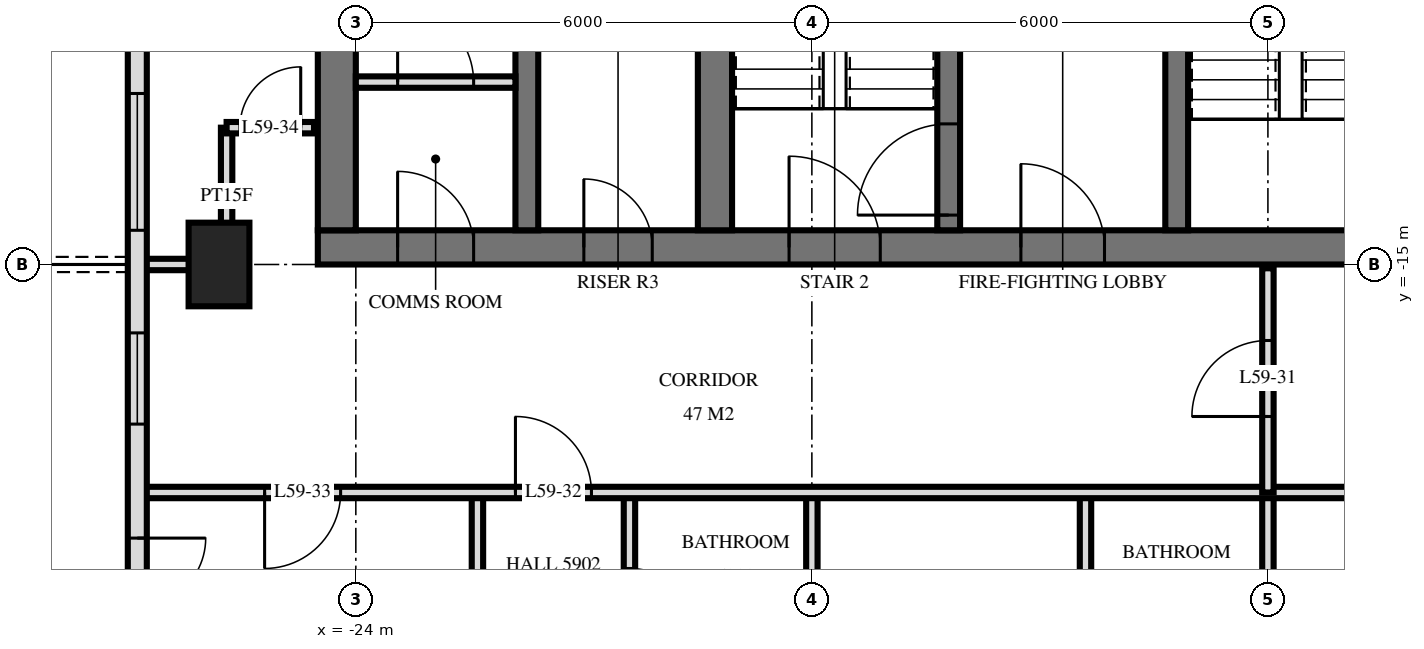
"""IFC4 building model, lengths in metres.
Left out: names, types, materials, properties, quantities, classifications, styles, units other than length and angle.
Written with IfcOpenShell. Run it as: python <this file> out.ifc"""

import sys

from ifc_helpers import new_model, si_unit, direction, frame, frame_2d, origin, origin_2d, place, context, subcontext, project, spatial, rectangle, extrude, element, fill, save


model = new_model("IFC4")
c1 = context("Model", 3, precision=1e-05, world=origin(), true_north=direction((0.0, 1.0)))
c2 = subcontext(c1, "Body", "Model", "MODEL_VIEW")
j1 = project(units=[si_unit("LENGTHUNIT", "METRE"), si_unit("PLANEANGLEUNIT", "RADIAN")], contexts=[c1])
p1 = place(None, origin())
s1 = spatial("IfcSite", under=j1, at=p1, CompositionType="ELEMENT")
p2 = place(p1, origin())
s2 = spatial("IfcBuilding", under=s1, at=p2, CompositionType="ELEMENT")
p3 = place(p2, frame((0.0, 0.0, 225.6)))
s3 = spatial("IfcBuildingStorey", under=s2, at=p3, CompositionType="ELEMENT", Elevation=225.6)
p4 = place(p3, frame((-25.8, -15.0, 0.0), z_axis=(0.0, 0.0, 1.0), x_axis=(0.0, 1.0, 0.0)))
e1 = element("IfcColumn", 1, at=p4, inside=s3, PredefinedType="COLUMN", context=c2, shape_type="SweptSolid", body=[
    extrude(rectangle(XDim=1.1, YDim=0.8, at=origin_2d()), origin(), (0.0, 0.0, 1.0), 3.5),
])
p5 = place(p3, frame((-24.5, -14.775, 0.0), z_axis=(0.0, 0.0, 1.0), x_axis=(1.0, 0.0, 0.0)))
e2 = element("IfcWall", 2, at=p5, inside=s3, PredefinedType="SHEAR", context=c2, shape_type="SweptSolid", body=[
    extrude(rectangle(XDim=14.5, YDim=0.45, at=frame_2d((7.25, 0.0))), origin(), (0.0, 0.0, 1.0), 3.5),
])
p6 = place(p5, frame((6.2, 0.0, 0.0)))
e3 = element("IfcOpeningElement", 3, at=p6, cuts=e2, PredefinedType="OPENING", context=c2, shape_type="SweptSolid", body=[
    extrude(rectangle(XDim=1.2, YDim=2.1, at=frame_2d((0.6, 1.05))), frame((0.0, 0.235, 0.0), z_axis=(0.0, -1.0, 0.0), x_axis=(1.0, 0.0, 0.0)), (0.0, 0.0, 1.0), 0.47),
])
p7 = place(p5, frame((9.25, 0.0, 0.0)))
e4 = element("IfcOpeningElement", 4, at=p7, cuts=e2, PredefinedType="OPENING", context=c2, shape_type="SweptSolid", body=[
    extrude(rectangle(XDim=1.1, YDim=2.1, at=frame_2d((0.55, 1.05))), frame((0.0, 0.235, 0.0), z_axis=(0.0, -1.0, 0.0), x_axis=(1.0, 0.0, 0.0)), (0.0, 0.0, 1.0), 0.47),
])
p8 = place(p5, frame((3.5, 0.0, 0.0)))
e5 = element("IfcOpeningElement", 5, at=p8, cuts=e2, PredefinedType="OPENING", context=c2, shape_type="SweptSolid", body=[
    extrude(rectangle(XDim=0.9, YDim=2.1, at=frame_2d((0.45, 1.05))), frame((0.0, 0.235, 0.0), z_axis=(0.0, -1.0, 0.0), x_axis=(1.0, 0.0, 0.0)), (0.0, 0.0, 1.0), 0.47),
])
p9 = place(p5, frame((1.05, 0.0, 0.0)))
e6 = element("IfcOpeningElement", 6, at=p9, cuts=e2, PredefinedType="OPENING", context=c2, shape_type="SweptSolid", body=[
    extrude(rectangle(XDim=1.0, YDim=2.1, at=frame_2d((0.5, 1.05))), frame((0.0, 0.235, 0.0), z_axis=(0.0, -1.0, 0.0), x_axis=(1.0, 0.0, 0.0)), (0.0, 0.0, 1.0), 0.47),
])
p10 = place(p3, frame((-24.25, -14.55, 0.0), z_axis=(0.0, 0.0, 1.0), x_axis=(0.0, 1.0, 0.0)))
e7 = element("IfcWall", 7, at=p10, inside=s3, PredefinedType="SHEAR", context=c2, shape_type="SweptSolid", body=[
    extrude(rectangle(XDim=14.1, YDim=0.5, at=frame_2d((7.05, 0.0))), origin(), (0.0, 0.0, 1.0), 3.5),
])
p11 = place(p3, frame((-13.2, -14.55, 0.0), z_axis=(0.0, 0.0, 1.0), x_axis=(0.0, 1.0, 0.0)))
e8 = element("IfcWall", 8, at=p11, inside=s3, PredefinedType="SHEAR", context=c2, shape_type="SweptSolid", body=[
    extrude(rectangle(XDim=5.4, YDim=0.3, at=frame_2d((2.7, 0.0))), origin(), (0.0, 0.0, 1.0), 3.5),
])
p12 = place(p11, frame((4.0, 0.0, 0.0)))
e9 = element("IfcOpeningElement", 9, at=p12, cuts=e8, PredefinedType="OPENING", context=c2, shape_type="SweptSolid", body=[
    extrude(rectangle(XDim=1.2, YDim=2.1, at=frame_2d((0.6, 1.05))), frame((0.0, 0.16, 0.0), z_axis=(0.0, -1.0, 0.0), x_axis=(1.0, 0.0, 0.0)), (0.0, 0.0, 1.0), 0.32),
])
p13 = place(p3, frame((-16.2, -14.55, 0.0), z_axis=(0.0, 0.0, 1.0), x_axis=(0.0, 1.0, 0.0)))
e10 = element("IfcWall", 10, at=p13, inside=s3, PredefinedType="SHEAR", context=c2, shape_type="SweptSolid", body=[
    extrude(rectangle(XDim=5.4, YDim=0.3, at=frame_2d((2.7, 0.0))), origin(), (0.0, 0.0, 1.0), 3.5),
])
p14 = place(p13, frame((0.2, 0.0, 0.0)))
e11 = element("IfcOpeningElement", 11, at=p14, cuts=e10, PredefinedType="OPENING", context=c2, shape_type="SweptSolid", body=[
    extrude(rectangle(XDim=1.2, YDim=2.1, at=frame_2d((0.6, 1.05))), frame((0.0, 0.16, 0.0), z_axis=(0.0, -1.0, 0.0), x_axis=(1.0, 0.0, 0.0)), (0.0, 0.0, 1.0), 0.32),
])
p15 = place(p3, frame((-19.275, -14.55, 0.0), z_axis=(0.0, 0.0, 1.0), x_axis=(0.0, 1.0, 0.0)))
e12 = element("IfcWall", 12, at=p15, inside=s3, PredefinedType="SHEAR", context=c2, shape_type="SweptSolid", body=[
    extrude(rectangle(XDim=5.4, YDim=0.45, at=frame_2d((2.7, 0.0))), origin(), (0.0, 0.0, 1.0), 3.5),
])
p16 = place(p3, frame((-21.75, -14.55, 0.0), z_axis=(0.0, 0.0, 1.0), x_axis=(0.0, 1.0, 0.0)))
e13 = element("IfcWall", 13, at=p16, inside=s3, PredefinedType="SHEAR", context=c2, shape_type="SweptSolid", body=[
    extrude(rectangle(XDim=5.4, YDim=0.3, at=frame_2d((2.7, 0.0))), origin(), (0.0, 0.0, 1.0), 3.5),
])
p17 = place(p3, frame((-26.875, -3.325, 0.0), z_axis=(0.0, 0.0, 1.0), x_axis=(0.0, -1.0, 0.0)))
e14 = element("IfcWall", 14, at=p17, inside=s3, PredefinedType="SOLIDWALL", context=c2, shape_type="SweptSolid", body=[
    extrude(rectangle(XDim=21.551, YDim=0.25, at=frame_2d((10.775, 0.0))), origin(), (0.0, 0.0, 1.0), 3.22),
])
p18 = place(p17, frame((6.575, 0.0, 0.0)))
e15 = element("IfcOpeningElement", 15, at=p18, cuts=e14, PredefinedType="OPENING", context=c2, shape_type="SweptSolid", body=[
    extrude(rectangle(XDim=1.8, YDim=2.4, at=frame_2d((0.9, 1.2))), frame((0.0, 0.135, 0.0), z_axis=(0.0, -1.0, 0.0), x_axis=(1.0, 0.0, 0.0)), (0.0, 0.0, 1.0), 0.27),
])
p19 = place(p17, frame((9.425, 0.0, 0.9)))
e16 = element("IfcOpeningElement", 16, at=p19, cuts=e14, PredefinedType="OPENING", context=c2, shape_type="SweptSolid", body=[
    extrude(rectangle(XDim=1.8, YDim=1.5, at=frame_2d((0.9, 0.75))), frame((0.0, 0.135, 0.0), z_axis=(0.0, -1.0, 0.0), x_axis=(1.0, 0.0, 0.0)), (0.0, 0.0, 1.0), 0.27),
])
p20 = place(p17, frame((12.575, 0.0, 0.9)))
e17 = element("IfcOpeningElement", 17, at=p20, cuts=e14, PredefinedType="OPENING", context=c2, shape_type="SweptSolid", body=[
    extrude(rectangle(XDim=1.2, YDim=1.5, at=frame_2d((0.6, 0.75))), frame((0.0, 0.135, 0.0), z_axis=(0.0, -1.0, 0.0), x_axis=(1.0, 0.0, 0.0)), (0.0, 0.0, 1.0), 0.27),
])
p21 = place(p17, frame((15.275, 0.0, 0.0)))
e18 = element("IfcOpeningElement", 18, at=p21, cuts=e14, PredefinedType="OPENING", context=c2, shape_type="SweptSolid", body=[
    extrude(rectangle(XDim=1.8, YDim=2.4, at=frame_2d((0.9, 1.2))), frame((0.0, 0.135, 0.0), z_axis=(0.0, -1.0, 0.0), x_axis=(1.0, 0.0, 0.0)), (0.0, 0.0, 1.0), 0.27),
])
p22 = place(p17, frame((18.875, 0.0, 0.0)))
e19 = element("IfcOpeningElement", 19, at=p22, cuts=e14, PredefinedType="OPENING", context=c2, shape_type="SweptSolid", body=[
    extrude(rectangle(XDim=1.8, YDim=2.4, at=frame_2d((0.9, 1.2))), frame((0.0, 0.135, 0.0), z_axis=(0.0, -1.0, 0.0), x_axis=(1.0, 0.0, 0.0)), (0.0, 0.0, 1.0), 0.27),
])
p23 = place(p3, frame((-24.0, -12.6, 0.0), z_axis=(0.0, 0.0, 1.0), x_axis=(1.0, 0.0, 0.0)))
e20 = element("IfcWall", 20, at=p23, inside=s3, PredefinedType="PARTITIONING", context=c2, shape_type="SweptSolid", body=[
    extrude(rectangle(XDim=2.1, YDim=0.15, at=frame_2d((1.05, 0.0))), origin(), (0.0, 0.0, 1.0), 3.2),
])
p24 = place(p23, frame((0.55, 0.0, 0.0)))
e21 = element("IfcOpeningElement", 21, at=p24, cuts=e20, PredefinedType="OPENING", context=c2, shape_type="SweptSolid", body=[
    extrude(rectangle(XDim=1.0, YDim=2.1, at=frame_2d((0.5, 1.05))), frame((0.0, 0.085, 0.0), z_axis=(0.0, -1.0, 0.0), x_axis=(1.0, 0.0, 0.0)), (0.0, 0.0, 1.0), 0.17),
])
p25 = place(p3, frame((-12.0, -18.0, 0.0), z_axis=(0.0, 0.0, 1.0), x_axis=(0.0, 1.0, 0.0)))
e22 = element("IfcWall", 22, at=p25, inside=s3, PredefinedType="PARTITIONING", context=c2, shape_type="SweptSolid", body=[
    extrude(rectangle(XDim=2.95, YDim=0.15, at=frame_2d((1.475, 0.0))), origin(), (0.0, 0.0, 1.0), 3.22),
])
p26 = place(p25, frame((1.0, 0.0, 0.0)))
e23 = element("IfcOpeningElement", 23, at=p26, cuts=e22, PredefinedType="OPENING", context=c2, shape_type="SweptSolid", body=[
    extrude(rectangle(XDim=1.0, YDim=2.1, at=frame_2d((0.5, 1.05))), frame((0.0, 0.085, 0.0), z_axis=(0.0, -1.0, 0.0), x_axis=(1.0, 0.0, 0.0)), (0.0, 0.0, 1.0), 0.17),
])
p27 = place(p3, frame((-12.0, -29.22, 0.0), z_axis=(0.0, 0.0, 1.0), x_axis=(0.0, 1.0, 0.0)))
e24 = element("IfcWall", 24, at=p27, inside=s3, PredefinedType="PARTITIONING", context=c2, shape_type="SweptSolid", body=[
    extrude(rectangle(XDim=11.22, YDim=0.15, at=frame_2d((5.61, 0.0))), origin(), (0.0, 0.0, 1.0), 3.22),
])
for number, where, z_axis, x_axis in (
    (25, (-14.4, -21.0, 0.0), (0.0, 0.0, 1.0), (0.0, 1.0, 0.0)),
    (26, (-18.0, -21.0, 0.0), (0.0, 0.0, 1.0), (0.0, 1.0, 0.0)),
):
    element("IfcWall", number, at=place(p3, frame(where, z_axis=z_axis, x_axis=x_axis)), inside=s3, PredefinedType="PARTITIONING", context=c2, shape_type="SweptSolid", body=[
        extrude(rectangle(XDim=3.0, YDim=0.15, at=frame_2d((1.5, 0.0))), origin(), (0.0, 0.0, 1.0), 3.22),
    ])
p28 = place(p3, frame((-20.4, -21.0, 0.0), z_axis=(0.0, 0.0, 1.0), x_axis=(0.0, 1.0, 0.0)))
e27 = element("IfcWall", 27, at=p28, inside=s3, PredefinedType="PARTITIONING", context=c2, shape_type="SweptSolid", body=[
    extrude(rectangle(XDim=3.0, YDim=0.15, at=frame_2d((1.5, 0.0))), origin(), (0.0, 0.0, 1.0), 3.22),
])
p29 = place(p28, frame((1.0, 0.0, 0.0)))
e28 = element("IfcOpeningElement", 28, at=p29, cuts=e27, PredefinedType="OPENING", context=c2, shape_type="SweptSolid", body=[
    extrude(rectangle(XDim=1.0, YDim=2.1, at=frame_2d((0.5, 1.05))), frame((0.0, 0.085, 0.0), z_axis=(0.0, -1.0, 0.0), x_axis=(1.0, 0.0, 0.0)), (0.0, 0.0, 1.0), 0.17),
])
p30 = place(p3, frame((-22.4, -21.0, 0.0), z_axis=(0.0, 0.0, 1.0), x_axis=(0.0, 1.0, 0.0)))
e29 = element("IfcWall", 29, at=p30, inside=s3, PredefinedType="PARTITIONING", context=c2, shape_type="SweptSolid", body=[
    extrude(rectangle(XDim=3.0, YDim=0.15, at=frame_2d((1.5, 0.0))), origin(), (0.0, 0.0, 1.0), 3.22),
])
p31 = place(p3, frame((-25.7, -15.0, 0.0), z_axis=(0.0, 0.0, 1.0), x_axis=(0.0, 1.0, 0.0)))
e30 = element("IfcWall", 30, at=p31, inside=s3, PredefinedType="PARTITIONING", context=c2, shape_type="SweptSolid", body=[
    extrude(rectangle(XDim=1.8, YDim=0.15, at=frame_2d((0.9, 0.0))), origin(), (0.0, 0.0, 1.0), 3.22),
])
p32 = place(p3, frame((-26.82, -18.0, 0.0), z_axis=(0.0, 0.0, 1.0), x_axis=(1.0, 0.0, 0.0)))
e31 = element("IfcWall", 31, at=p32, inside=s3, PredefinedType="PARTITIONING", context=c2, shape_type="SweptSolid", body=[
    extrude(rectangle(XDim=53.64, YDim=0.15, at=frame_2d((26.82, 0.0))), origin(), (0.0, 0.0, 1.0), 3.22),
])
p33 = place(p32, frame((4.92, 0.0, 0.0)))
e32 = element("IfcOpeningElement", 32, at=p33, cuts=e31, PredefinedType="OPENING", context=c2, shape_type="SweptSolid", body=[
    extrude(rectangle(XDim=1.0, YDim=2.1, at=frame_2d((0.5, 1.05))), frame((0.0, 0.085, 0.0), z_axis=(0.0, -1.0, 0.0), x_axis=(1.0, 0.0, 0.0)), (0.0, 0.0, 1.0), 0.17),
])
p34 = place(p32, frame((1.62, 0.0, 0.0)))
e33 = element("IfcOpeningElement", 33, at=p34, cuts=e31, PredefinedType="OPENING", context=c2, shape_type="SweptSolid", body=[
    extrude(rectangle(XDim=1.0, YDim=2.1, at=frame_2d((0.5, 1.05))), frame((0.0, 0.085, 0.0), z_axis=(0.0, -1.0, 0.0), x_axis=(1.0, 0.0, 0.0)), (0.0, 0.0, 1.0), 0.17),
])
p35 = place(p32, frame((38.97, 0.0, 0.0)))
e34 = element("IfcOpeningElement", 34, at=p35, cuts=e31, PredefinedType="OPENING", context=c2, shape_type="SweptSolid", body=[
    extrude(rectangle(XDim=1.0, YDim=2.1, at=frame_2d((0.5, 1.05))), frame((0.0, 0.085, 0.0), z_axis=(0.0, -1.0, 0.0), x_axis=(1.0, 0.0, 0.0)), (0.0, 0.0, 1.0), 0.17),
])
p36 = place(p32, frame((48.72, 0.0, 0.0)))
e35 = element("IfcOpeningElement", 35, at=p36, cuts=e31, PredefinedType="OPENING", context=c2, shape_type="SweptSolid", body=[
    extrude(rectangle(XDim=1.0, YDim=2.1, at=frame_2d((0.5, 1.05))), frame((0.0, 0.085, 0.0), z_axis=(0.0, -1.0, 0.0), x_axis=(1.0, 0.0, 0.0)), (0.0, 0.0, 1.0), 0.17),
])
p37 = place(p32, frame((46.92, 0.0, 0.0)))
e36 = element("IfcOpeningElement", 36, at=p37, cuts=e31, PredefinedType="OPENING", context=c2, shape_type="SweptSolid", body=[
    extrude(rectangle(XDim=1.0, YDim=2.1, at=frame_2d((0.5, 1.05))), frame((0.0, 0.085, 0.0), z_axis=(0.0, -1.0, 0.0), x_axis=(1.0, 0.0, 0.0)), (0.0, 0.0, 1.0), 0.17),
])
p38 = place(p32, frame((18.82, 0.0, 0.0)))
e37 = element("IfcOpeningElement", 37, at=p38, cuts=e31, PredefinedType="OPENING", context=c2, shape_type="SweptSolid", body=[
    extrude(rectangle(XDim=1.0, YDim=2.1, at=frame_2d((0.5, 1.05))), frame((0.0, 0.085, 0.0), z_axis=(0.0, -1.0, 0.0), x_axis=(1.0, 0.0, 0.0)), (0.0, 0.0, 1.0), 0.17),
])
p39 = place(p32, frame((27.82, 0.0, 0.0)))
e38 = element("IfcOpeningElement", 38, at=p39, cuts=e31, PredefinedType="OPENING", context=c2, shape_type="SweptSolid", body=[
    extrude(rectangle(XDim=1.0, YDim=2.1, at=frame_2d((0.5, 1.05))), frame((0.0, 0.085, 0.0), z_axis=(0.0, -1.0, 0.0), x_axis=(1.0, 0.0, 0.0)), (0.0, 0.0, 1.0), 0.17),
])
p40 = place(p32, frame((35.32, 0.0, 0.0)))
e39 = element("IfcOpeningElement", 39, at=p40, cuts=e31, PredefinedType="OPENING", context=c2, shape_type="SweptSolid", body=[
    extrude(rectangle(XDim=1.0, YDim=2.1, at=frame_2d((0.5, 1.05))), frame((0.0, 0.085, 0.0), z_axis=(0.0, -1.0, 0.0), x_axis=(1.0, 0.0, 0.0)), (0.0, 0.0, 1.0), 0.17),
])
p41 = place(p3, frame((-26.82, -15.0, 0.0), z_axis=(0.0, 0.0, 1.0), x_axis=(1.0, 0.0, 0.0)))
e40 = element("IfcWall", 40, at=p41, inside=s3, PredefinedType="PARTITIONING", context=c2, shape_type="SweptSolid", body=[
    extrude(rectangle(XDim=1.12, YDim=0.15, at=frame_2d((0.56, 0.0))), origin(), (0.0, 0.0, 1.0), 3.22),
])
p42 = place(p3, frame((-25.7, -13.2, 0.0), z_axis=(0.0, 0.0, 1.0), x_axis=(1.0, 0.0, 0.0)))
e41 = element("IfcWall", 41, at=p42, inside=s3, PredefinedType="PARTITIONING", context=c2, shape_type="SweptSolid", body=[
    extrude(rectangle(XDim=1.15, YDim=0.15, at=frame_2d((0.575, 0.0))), origin(), (0.0, 0.0, 1.0), 3.22),
])
p43 = place(p42, frame((0.175, 0.0, 0.0)))
e42 = element("IfcOpeningElement", 42, at=p43, cuts=e41, PredefinedType="OPENING", context=c2, shape_type="SweptSolid", body=[
    extrude(rectangle(XDim=0.8, YDim=2.1, at=frame_2d((0.4, 1.05))), frame((0.0, 0.085, 0.0), z_axis=(0.0, -1.0, 0.0), x_axis=(1.0, 0.0, 0.0)), (0.0, 0.0, 1.0), 0.17),
])
p44 = place(p19, origin())
e43 = element("IfcWindow", 43, at=p44, inside=s3, PartitioningType="SINGLE_PANEL", PredefinedType="WINDOW", context=c2, shape_type="SweptSolid", body=[
    extrude(rectangle(XDim=1.8, YDim=1.5, at=frame_2d((0.9, 0.75))), frame((0.0, 0.03, 0.0), z_axis=(0.0, -1.0, 0.0), x_axis=(1.0, 0.0, 0.0)), (0.0, 0.0, 1.0), 0.06),
])
fill(e16, e43)
p45 = place(p20, origin())
e44 = element("IfcWindow", 44, at=p45, inside=s3, PartitioningType="SINGLE_PANEL", PredefinedType="WINDOW", context=c2, shape_type="SweptSolid", body=[
    extrude(rectangle(XDim=1.2, YDim=1.5, at=frame_2d((0.6, 0.75))), frame((0.0, 0.03, 0.0), z_axis=(0.0, -1.0, 0.0), x_axis=(1.0, 0.0, 0.0)), (0.0, 0.0, 1.0), 0.06),
])
fill(e17, e44)
p46 = place(p21, origin())
e45 = element("IfcDoor", 45, at=p46, inside=s3, OperationType="DOUBLE_DOOR_SINGLE_SWING", PredefinedType="DOOR", context=c2, shape_type="SweptSolid", body=[
    extrude(rectangle(XDim=1.8, YDim=2.4, at=frame_2d((0.9, 1.2))), frame((0.0, 0.025, 0.0), z_axis=(0.0, -1.0, 0.0), x_axis=(1.0, 0.0, 0.0)), (0.0, 0.0, 1.0), 0.05),
])
fill(e18, e45)
p47 = place(p6, origin())
e46 = element("IfcDoor", 46, at=p47, inside=s3, OperationType="SINGLE_SWING_RIGHT", PredefinedType="DOOR", context=c2, shape_type="SweptSolid", body=[
    extrude(rectangle(XDim=1.2, YDim=2.1, at=frame_2d((0.6, 1.05))), frame((0.0, 0.025, 0.0), z_axis=(0.0, -1.0, 0.0), x_axis=(1.0, 0.0, 0.0)), (0.0, 0.0, 1.0), 0.05),
])
fill(e3, e46)
p48 = place(p7, origin())
e47 = element("IfcDoor", 47, at=p48, inside=s3, OperationType="SINGLE_SWING_RIGHT", PredefinedType="DOOR", context=c2, shape_type="SweptSolid", body=[
    extrude(rectangle(XDim=1.1, YDim=2.1, at=frame_2d((0.55, 1.05))), frame((0.0, 0.025, 0.0), z_axis=(0.0, -1.0, 0.0), x_axis=(1.0, 0.0, 0.0)), (0.0, 0.0, 1.0), 0.05),
])
fill(e4, e47)
p49 = place(p8, origin())
e48 = element("IfcDoor", 48, at=p49, inside=s3, OperationType="SINGLE_SWING_RIGHT", PredefinedType="DOOR", context=c2, shape_type="SweptSolid", body=[
    extrude(rectangle(XDim=0.9, YDim=2.1, at=frame_2d((0.45, 1.05))), frame((0.0, 0.025, 0.0), z_axis=(0.0, -1.0, 0.0), x_axis=(1.0, 0.0, 0.0)), (0.0, 0.0, 1.0), 0.05),
])
fill(e5, e48)
p50 = place(p9, origin())
e49 = element("IfcDoor", 49, at=p50, inside=s3, OperationType="SINGLE_SWING_RIGHT", PredefinedType="DOOR", context=c2, shape_type="SweptSolid", body=[
    extrude(rectangle(XDim=1.0, YDim=2.1, at=frame_2d((0.5, 1.05))), frame((0.0, 0.025, 0.0), z_axis=(0.0, -1.0, 0.0), x_axis=(1.0, 0.0, 0.0)), (0.0, 0.0, 1.0), 0.05),
])
fill(e6, e49)
p51 = place(p14, origin())
e50 = element("IfcDoor", 50, at=p51, inside=s3, OperationType="SINGLE_SWING_RIGHT", PredefinedType="DOOR", context=c2, shape_type="SweptSolid", body=[
    extrude(rectangle(XDim=1.2, YDim=2.1, at=frame_2d((0.6, 1.05))), frame((0.0, 0.025, 0.0), z_axis=(0.0, -1.0, 0.0), x_axis=(1.0, 0.0, 0.0)), (0.0, 0.0, 1.0), 0.05),
])
fill(e11, e50)
p52 = place(p24, origin())
e51 = element("IfcDoor", 51, at=p52, inside=s3, OperationType="SINGLE_SWING_RIGHT", PredefinedType="DOOR", context=c2, shape_type="SweptSolid", body=[
    extrude(rectangle(XDim=1.0, YDim=2.1, at=frame_2d((0.5, 1.05))), frame((0.0, 0.025, 0.0), z_axis=(0.0, -1.0, 0.0), x_axis=(1.0, 0.0, 0.0)), (0.0, 0.0, 1.0), 0.05),
])
fill(e21, e51)
p53 = place(p26, origin())
e52 = element("IfcDoor", 52, at=p53, inside=s3, OperationType="SINGLE_SWING_RIGHT", PredefinedType="DOOR", context=c2, shape_type="SweptSolid", body=[
    extrude(rectangle(XDim=1.0, YDim=2.1, at=frame_2d((0.5, 1.05))), frame((0.0, 0.025, 0.0), z_axis=(0.0, -1.0, 0.0), x_axis=(1.0, 0.0, 0.0)), (0.0, 0.0, 1.0), 0.05),
])
fill(e23, e52)
p54 = place(p33, origin())
e53 = element("IfcDoor", 53, at=p54, inside=s3, OperationType="SINGLE_SWING_RIGHT", PredefinedType="DOOR", context=c2, shape_type="SweptSolid", body=[
    extrude(rectangle(XDim=1.0, YDim=2.1, at=frame_2d((0.5, 1.05))), frame((0.0, 0.025, 0.0), z_axis=(0.0, -1.0, 0.0), x_axis=(1.0, 0.0, 0.0)), (0.0, 0.0, 1.0), 0.05),
])
fill(e32, e53)
p55 = place(p34, frame((0.5, 0.0, 0.0), z_axis=(0.0, 0.0, 1.0), x_axis=(-1.0, 0.0, 0.0)))
e54 = element("IfcDoor", 54, at=p55, inside=s3, OperationType="SINGLE_SWING_LEFT", PredefinedType="DOOR", context=c2, shape_type="SweptSolid", body=[
    extrude(rectangle(XDim=1.0, YDim=2.1, at=frame_2d((0.0, 1.05))), frame((0.0, -0.025, 0.0), z_axis=(0.0, 1.0, 0.0), x_axis=(-1.0, 0.0, 0.0)), (0.0, 0.0, 1.0), 0.05),
])
fill(e33, e54)
p56 = place(p43, origin())
e55 = element("IfcDoor", 55, at=p56, inside=s3, OperationType="SINGLE_SWING_LEFT", PredefinedType="DOOR", context=c2, shape_type="SweptSolid", body=[
    extrude(rectangle(XDim=0.8, YDim=2.1, at=frame_2d((0.4, 1.05))), frame((0.0, 0.025, 0.0), z_axis=(0.0, -1.0, 0.0), x_axis=(1.0, 0.0, 0.0)), (0.0, 0.0, 1.0), 0.05),
])
fill(e42, e55)
save(model, sys.argv[1])
